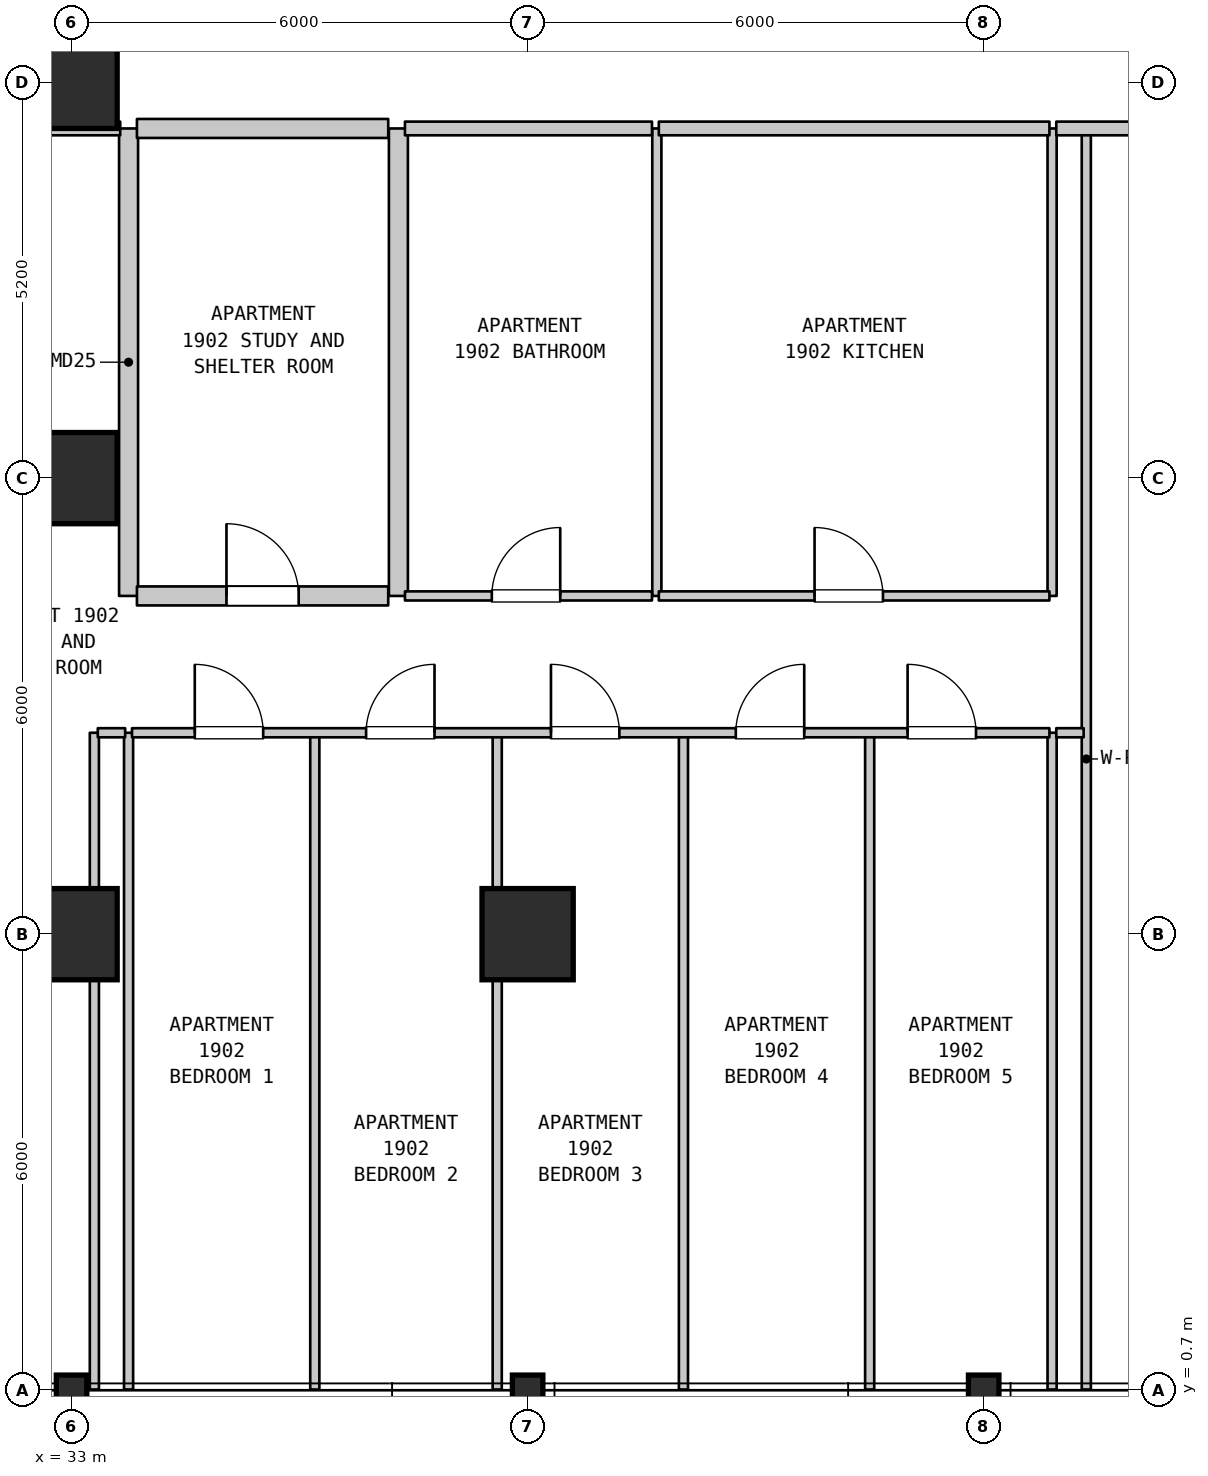
"""IFC4 building model, lengths in metres.
Left out: names, types, materials, properties, quantities, classifications, styles, units other than length and angle.
Written with IfcOpenShell. Run it as: python <this file> out.ifc"""

import sys

from ifc_helpers import new_model, si_unit, direction, frame, frame_2d, origin, origin_2d, place, context, subcontext, project, spatial, rectangle, i_section, extrude, element, fill, save


model = new_model("IFC4")
c1 = context("Model", 3, precision=1e-05, world=origin(), true_north=direction((0.0, 1.0)))
c2 = subcontext(c1, "Body", "Model", "MODEL_VIEW")
j1 = project(units=[si_unit("LENGTHUNIT", "METRE"), si_unit("PLANEANGLEUNIT", "RADIAN")], contexts=[c1])
p1 = place(None, origin())
s1 = spatial("IfcSite", under=j1, at=p1, CompositionType="ELEMENT")
p2 = place(p1, origin())
s2 = spatial("IfcBuilding", under=s1, at=p2, CompositionType="ELEMENT")
p3 = place(p2, frame((0.0, 0.0, 81.2)))
s3 = spatial("IfcBuildingStorey", under=s2, at=p3, CompositionType="ELEMENT", Elevation=81.2)
p4 = place(p3, frame((33.0, 0.7, 0.0), z_axis=(0.0, 0.0, 1.0), x_axis=(1.0, 0.0, 0.0)))
e1 = element("IfcColumn", 1, at=p4, inside=s3, PredefinedType="COLUMN", context=c2, shape_type="SweptSolid", body=[
    extrude(i_section(OverallWidth=0.401, OverallDepth=0.399, WebThickness=0.025, FlangeThickness=0.04, FilletRadius=0.015, at=origin_2d()), origin(), (0.0, 0.0, 1.0), 5.2),
])
for number, where, z_axis, x_axis in (
    (2, (33.0, 6.7, 0.0), (0.0, 0.0, 1.0), (1.0, 0.0, 0.0)),
    (3, (33.0, 12.7, 0.0), (0.0, 0.0, 1.0), (1.0, 0.0, 0.0)),
    (4, (33.0, 17.9, 0.0), (0.0, 0.0, 1.0), (1.0, 0.0, 0.0)),
):
    element("IfcColumn", number, at=place(p3, frame(where, z_axis=z_axis, x_axis=x_axis)), inside=s3, PredefinedType="COLUMN", context=c2, shape_type="SweptSolid", body=[
        extrude(rectangle(XDim=1.2, YDim=1.2, at=origin_2d()), origin(), (0.0, 0.0, 1.0), 5.2),
    ])
p5 = place(p3, frame((39.0, 0.7, 0.0), z_axis=(0.0, 0.0, 1.0), x_axis=(1.0, 0.0, 0.0)))
e5 = element("IfcColumn", 5, at=p5, inside=s3, PredefinedType="COLUMN", context=c2, shape_type="SweptSolid", body=[
    extrude(i_section(OverallWidth=0.401, OverallDepth=0.399, WebThickness=0.025, FlangeThickness=0.04, FilletRadius=0.015, at=origin_2d()), origin(), (0.0, 0.0, 1.0), 5.2),
])
p6 = place(p3, frame((39.0, 6.7, 0.0), z_axis=(0.0, 0.0, 1.0), x_axis=(1.0, 0.0, 0.0)))
e6 = element("IfcColumn", 6, at=p6, inside=s3, PredefinedType="COLUMN", context=c2, shape_type="SweptSolid", body=[
    extrude(rectangle(XDim=1.2, YDim=1.2, at=origin_2d()), origin(), (0.0, 0.0, 1.0), 5.2),
])
p7 = place(p3, frame((45.0, 0.7, 0.0), z_axis=(0.0, 0.0, 1.0), x_axis=(1.0, 0.0, 0.0)))
e7 = element("IfcColumn", 7, at=p7, inside=s3, PredefinedType="COLUMN", context=c2, shape_type="SweptSolid", body=[
    extrude(i_section(OverallWidth=0.401, OverallDepth=0.399, WebThickness=0.025, FlangeThickness=0.04, FilletRadius=0.015, at=origin_2d()), origin(), (0.0, 0.0, 1.0), 5.2),
])
for number, where, z_axis, x_axis in (
    (8, (33.3, 0.71, 0.0), (0.0, 0.0, 1.0), (0.0, 1.0, 0.0)),
    (9, (33.75, 0.71, 0.0), (0.0, 0.0, 1.0), (0.0, 1.0, 0.0)),
):
    element("IfcWall", number, at=place(p3, frame(where, z_axis=z_axis, x_axis=x_axis)), inside=s3, PredefinedType="PARTITIONING", context=c2, shape_type="SweptSolid", body=[
        extrude(rectangle(XDim=8.64, YDim=0.12, at=frame_2d((4.32, 0.0))), origin(), (0.0, 0.0, 1.0), 4.885),
    ])
p8 = place(p3, frame((33.75, 11.15, 0.0), z_axis=(0.0, 0.0, 1.0), x_axis=(0.0, 1.0, 0.0)))
e10 = element("IfcWall", 10, at=p8, inside=s3, PredefinedType="STANDARD", context=c2, shape_type="SweptSolid", body=[
    extrude(rectangle(XDim=6.15, YDim=0.25, at=frame_2d((3.075, 0.0))), origin(), (0.0, 0.0, 1.0), 4.885),
])
p9 = place(p3, frame((36.2, 0.71, 0.0), z_axis=(0.0, 0.0, 1.0), x_axis=(0.0, 1.0, 0.0)))
e11 = element("IfcWall", 11, at=p9, inside=s3, PredefinedType="PARTITIONING", context=c2, shape_type="SweptSolid", body=[
    extrude(rectangle(XDim=8.64, YDim=0.12, at=frame_2d((4.32, 0.0))), origin(), (0.0, 0.0, 1.0), 4.885),
])
p10 = place(p3, frame((37.3, 11.15, 0.0), z_axis=(0.0, 0.0, 1.0), x_axis=(0.0, 1.0, 0.0)))
e12 = element("IfcWall", 12, at=p10, inside=s3, PredefinedType="STANDARD", context=c2, shape_type="SweptSolid", body=[
    extrude(rectangle(XDim=6.15, YDim=0.25, at=frame_2d((3.075, 0.0))), origin(), (0.0, 0.0, 1.0), 4.885),
])
p11 = place(p3, frame((38.6, 0.71, 0.0), z_axis=(0.0, 0.0, 1.0), x_axis=(0.0, 1.0, 0.0)))
e13 = element("IfcWall", 13, at=p11, inside=s3, PredefinedType="PARTITIONING", context=c2, shape_type="SweptSolid", body=[
    extrude(rectangle(XDim=8.64, YDim=0.12, at=frame_2d((4.32, 0.0))), origin(), (0.0, 0.0, 1.0), 4.885),
])
p12 = place(p3, frame((40.7, 11.15, 0.0), z_axis=(0.0, 0.0, 1.0), x_axis=(0.0, 1.0, 0.0)))
e14 = element("IfcWall", 14, at=p12, inside=s3, PredefinedType="PARTITIONING", context=c2, shape_type="SweptSolid", body=[
    extrude(rectangle(XDim=6.15, YDim=0.12, at=frame_2d((3.075, 0.0))), origin(), (0.0, 0.0, 1.0), 4.885),
])
for number, where, z_axis, x_axis in (
    (15, (41.05, 0.71, 0.0), (0.0, 0.0, 1.0), (0.0, 1.0, 0.0)),
    (16, (43.5, 0.71, 0.0), (0.0, 0.0, 1.0), (0.0, 1.0, 0.0)),
    (17, (45.9, 0.71, 0.0), (0.0, 0.0, 1.0), (0.0, 1.0, 0.0)),
):
    element("IfcWall", number, at=place(p3, frame(where, z_axis=z_axis, x_axis=x_axis)), inside=s3, PredefinedType="PARTITIONING", context=c2, shape_type="SweptSolid", body=[
        extrude(rectangle(XDim=8.64, YDim=0.12, at=frame_2d((4.32, 0.0))), origin(), (0.0, 0.0, 1.0), 4.885),
    ])
p13 = place(p3, frame((45.9, 11.15, 0.0), z_axis=(0.0, 0.0, 1.0), x_axis=(0.0, 1.0, 0.0)))
e18 = element("IfcWall", 18, at=p13, inside=s3, PredefinedType="PARTITIONING", context=c2, shape_type="SweptSolid", body=[
    extrude(rectangle(XDim=6.15, YDim=0.12, at=frame_2d((3.075, 0.0))), origin(), (0.0, 0.0, 1.0), 4.885),
])
p14 = place(p3, frame((46.35, 0.71, 0.0), z_axis=(0.0, 0.0, 1.0), x_axis=(0.0, 1.0, 0.0)))
e19 = element("IfcWall", 19, at=p14, inside=s3, PredefinedType="PARTITIONING", context=c2, shape_type="SweptSolid", body=[
    extrude(rectangle(XDim=16.59, YDim=0.12, at=frame_2d((8.295, 0.0))), origin(), (0.0, 0.0, 1.0), 4.885),
])
p15 = place(p3, frame((33.345, 9.35, 0.0), z_axis=(0.0, 0.0, 1.0), x_axis=(1.0, 0.0, 0.0)))
e20 = element("IfcWall", 20, at=p15, inside=s3, PredefinedType="PARTITIONING", context=c2, shape_type="SweptSolid", body=[
    extrude(rectangle(XDim=0.36, YDim=0.12, at=frame_2d((0.18, 0.0))), origin(), (0.0, 0.0, 1.0), 4.885),
])
p16 = place(p3, frame((33.795, 9.35, 0.0), z_axis=(0.0, 0.0, 1.0), x_axis=(1.0, 0.0, 0.0)))
e21 = element("IfcWall", 21, at=p16, inside=s3, PredefinedType="PARTITIONING", context=c2, shape_type="SweptSolid", body=[
    extrude(rectangle(XDim=12.07, YDim=0.12, at=frame_2d((6.035, 0.0))), origin(), (0.0, 0.0, 1.0), 4.885),
])
p17 = place(p16, frame((0.826, 0.0, 0.0)))
e22 = element("IfcOpeningElement", 22, at=p17, cuts=e21, PredefinedType="OPENING", context=c2, shape_type="SweptSolid", body=[
    extrude(rectangle(XDim=0.9, YDim=2.15, at=frame_2d((0.45, 1.075))), frame((0.0, 0.07, 0.0), z_axis=(0.0, -1.0, 0.0), x_axis=(1.0, 0.0, 0.0)), (0.0, 0.0, 1.0), 0.14),
])
p18 = place(p16, frame((3.08, 0.0, 0.0)))
e23 = element("IfcOpeningElement", 23, at=p18, cuts=e21, PredefinedType="OPENING", context=c2, shape_type="SweptSolid", body=[
    extrude(rectangle(XDim=0.9, YDim=2.15, at=frame_2d((0.45, 1.075))), frame((0.0, 0.07, 0.0), z_axis=(0.0, -1.0, 0.0), x_axis=(1.0, 0.0, 0.0)), (0.0, 0.0, 1.0), 0.14),
])
p19 = place(p16, frame((5.512, 0.0, 0.0)))
e24 = element("IfcOpeningElement", 24, at=p19, cuts=e21, PredefinedType="OPENING", context=c2, shape_type="SweptSolid", body=[
    extrude(rectangle(XDim=0.9, YDim=2.15, at=frame_2d((0.45, 1.075))), frame((0.0, 0.07, 0.0), z_axis=(0.0, -1.0, 0.0), x_axis=(1.0, 0.0, 0.0)), (0.0, 0.0, 1.0), 0.14),
])
p20 = place(p16, frame((7.944, 0.0, 0.0)))
e25 = element("IfcOpeningElement", 25, at=p20, cuts=e21, PredefinedType="OPENING", context=c2, shape_type="SweptSolid", body=[
    extrude(rectangle(XDim=0.9, YDim=2.15, at=frame_2d((0.45, 1.075))), frame((0.0, 0.07, 0.0), z_axis=(0.0, -1.0, 0.0), x_axis=(1.0, 0.0, 0.0)), (0.0, 0.0, 1.0), 0.14),
])
p21 = place(p16, frame((10.204, 0.0, 0.0)))
e26 = element("IfcOpeningElement", 26, at=p21, cuts=e21, PredefinedType="OPENING", context=c2, shape_type="SweptSolid", body=[
    extrude(rectangle(XDim=0.9, YDim=2.15, at=frame_2d((0.45, 1.075))), frame((0.0, 0.07, 0.0), z_axis=(0.0, -1.0, 0.0), x_axis=(1.0, 0.0, 0.0)), (0.0, 0.0, 1.0), 0.14),
])
p22 = place(p3, frame((45.955, 9.35, 0.0), z_axis=(0.0, 0.0, 1.0), x_axis=(1.0, 0.0, 0.0)))
e27 = element("IfcWall", 27, at=p22, inside=s3, PredefinedType="PARTITIONING", context=c2, shape_type="SweptSolid", body=[
    extrude(rectangle(XDim=0.36, YDim=0.12, at=frame_2d((0.18, 0.0))), origin(), (0.0, 0.0, 1.0), 4.885),
])
p23 = place(p3, frame((33.86, 11.15, 0.0), z_axis=(0.0, 0.0, 1.0), x_axis=(1.0, 0.0, 0.0)))
e28 = element("IfcWall", 28, at=p23, inside=s3, PredefinedType="STANDARD", context=c2, shape_type="SweptSolid", body=[
    extrude(rectangle(XDim=3.306, YDim=0.25, at=frame_2d((1.653, 0.0))), origin(), (0.0, 0.0, 1.0), 4.885),
])
p24 = place(p23, frame((1.178, 0.0, 0.0)))
e29 = element("IfcOpeningElement", 29, at=p24, cuts=e28, PredefinedType="OPENING", context=c2, shape_type="SweptSolid", body=[
    extrude(rectangle(XDim=0.95, YDim=2.15, at=frame_2d((0.475, 1.075))), frame((0.0, 0.135, 0.0), z_axis=(0.0, -1.0, 0.0), x_axis=(1.0, 0.0, 0.0)), (0.0, 0.0, 1.0), 0.27),
])
p25 = place(p3, frame((37.386, 11.15, 0.0), z_axis=(0.0, 0.0, 1.0), x_axis=(1.0, 0.0, 0.0)))
e30 = element("IfcWall", 30, at=p25, inside=s3, PredefinedType="PARTITIONING", context=c2, shape_type="SweptSolid", body=[
    extrude(rectangle(XDim=3.25, YDim=0.12, at=frame_2d((1.625, 0.0))), origin(), (0.0, 0.0, 1.0), 4.885),
])
p26 = place(p25, frame((1.143, 0.0, 0.0)))
e31 = element("IfcOpeningElement", 31, at=p26, cuts=e30, PredefinedType="OPENING", context=c2, shape_type="SweptSolid", body=[
    extrude(rectangle(XDim=0.9, YDim=2.1, at=frame_2d((0.45, 1.05))), frame((0.0, 0.07, 0.0), z_axis=(0.0, -1.0, 0.0), x_axis=(1.0, 0.0, 0.0)), (0.0, 0.0, 1.0), 0.14),
])
p27 = place(p3, frame((40.726, 11.15, 0.0), z_axis=(0.0, 0.0, 1.0), x_axis=(1.0, 0.0, 0.0)))
e32 = element("IfcWall", 32, at=p27, inside=s3, PredefinedType="PARTITIONING", context=c2, shape_type="SweptSolid", body=[
    extrude(rectangle(XDim=5.139, YDim=0.12, at=frame_2d((2.569, 0.0))), origin(), (0.0, 0.0, 1.0), 4.885),
])
p28 = place(p27, frame((2.049, 0.0, 0.0)))
e33 = element("IfcOpeningElement", 33, at=p28, cuts=e32, PredefinedType="OPENING", context=c2, shape_type="SweptSolid", body=[
    extrude(rectangle(XDim=0.9, YDim=2.15, at=frame_2d((0.45, 1.075))), frame((0.0, 0.07, 0.0), z_axis=(0.0, -1.0, 0.0), x_axis=(1.0, 0.0, 0.0)), (0.0, 0.0, 1.0), 0.14),
])
p29 = place(p3, frame((28.545, 17.3, 0.0), z_axis=(0.0, 0.0, 1.0), x_axis=(1.0, 0.0, 0.0)))
e34 = element("IfcWall", 34, at=p29, inside=s3, PredefinedType="STANDARD", context=c2, shape_type="SweptSolid", body=[
    extrude(rectangle(XDim=5.095, YDim=0.18, at=frame_2d((2.547, 0.0))), origin(), (0.0, 0.0, 1.0), 4.885),
])
p30 = place(p29, frame((2.08, 0.0, 0.0)))
e35 = element("IfcOpeningElement", 35, at=p30, cuts=e34, PredefinedType="OPENING", context=c2, shape_type="SweptSolid", body=[
    extrude(rectangle(XDim=1.0, YDim=2.15, at=frame_2d((0.5, 1.075))), frame((0.0, 0.1, 0.0), z_axis=(0.0, -1.0, 0.0), x_axis=(1.0, 0.0, 0.0)), (0.0, 0.0, 1.0), 0.2),
])
p31 = place(p3, frame((33.86, 17.3, 0.0), z_axis=(0.0, 0.0, 1.0), x_axis=(1.0, 0.0, 0.0)))
e36 = element("IfcWall", 36, at=p31, inside=s3, PredefinedType="STANDARD", context=c2, shape_type="SweptSolid", body=[
    extrude(rectangle(XDim=3.306, YDim=0.25, at=frame_2d((1.653, 0.0))), origin(), (0.0, 0.0, 1.0), 4.885),
])
p32 = place(p3, frame((37.386, 17.3, 0.0), z_axis=(0.0, 0.0, 1.0), x_axis=(1.0, 0.0, 0.0)))
e37 = element("IfcWall", 37, at=p32, inside=s3, PredefinedType="STANDARD", context=c2, shape_type="SweptSolid", body=[
    extrude(rectangle(XDim=3.25, YDim=0.18, at=frame_2d((1.625, 0.0))), origin(), (0.0, 0.0, 1.0), 4.885),
])
p33 = place(p3, frame((40.726, 17.3, 0.0), z_axis=(0.0, 0.0, 1.0), x_axis=(1.0, 0.0, 0.0)))
e38 = element("IfcWall", 38, at=p33, inside=s3, PredefinedType="STANDARD", context=c2, shape_type="SweptSolid", body=[
    extrude(rectangle(XDim=5.139, YDim=0.18, at=frame_2d((2.569, 0.0))), origin(), (0.0, 0.0, 1.0), 4.885),
])
p34 = place(p3, frame((45.955, 17.3, 0.0), z_axis=(0.0, 0.0, 1.0), x_axis=(1.0, 0.0, 0.0)))
e39 = element("IfcWall", 39, at=p34, inside=s3, PredefinedType="STANDARD", context=c2, shape_type="SweptSolid", body=[
    extrude(rectangle(XDim=4.8, YDim=0.18, at=frame_2d((2.4, 0.0))), origin(), (0.0, 0.0, 1.0), 4.885),
])
p35 = place(p34, frame((1.9, 0.0, 0.0)))
e40 = element("IfcOpeningElement", 40, at=p35, cuts=e39, PredefinedType="OPENING", context=c2, shape_type="SweptSolid", body=[
    extrude(rectangle(XDim=1.0, YDim=2.15, at=frame_2d((0.5, 1.075))), frame((0.0, 0.1, 0.0), z_axis=(0.0, -1.0, 0.0), x_axis=(1.0, 0.0, 0.0)), (0.0, 0.0, 1.0), 0.2),
])
p36 = place(p17, origin())
e41 = element("IfcDoor", 41, at=p36, inside=s3, OperationType="SINGLE_SWING_LEFT", PredefinedType="DOOR", context=c2, shape_type="SweptSolid", body=[
    extrude(rectangle(XDim=0.9, YDim=2.15, at=frame_2d((0.45, 1.075))), frame((0.0, 0.025, 0.0), z_axis=(0.0, -1.0, 0.0), x_axis=(1.0, 0.0, 0.0)), (0.0, 0.0, 1.0), 0.05),
])
fill(e22, e41)
p37 = place(p18, origin())
e42 = element("IfcDoor", 42, at=p37, inside=s3, OperationType="SINGLE_SWING_RIGHT", PredefinedType="DOOR", context=c2, shape_type="SweptSolid", body=[
    extrude(rectangle(XDim=0.9, YDim=2.15, at=frame_2d((0.45, 1.075))), frame((0.0, 0.025, 0.0), z_axis=(0.0, -1.0, 0.0), x_axis=(1.0, 0.0, 0.0)), (0.0, 0.0, 1.0), 0.05),
])
fill(e23, e42)
p38 = place(p19, origin())
e43 = element("IfcDoor", 43, at=p38, inside=s3, OperationType="SINGLE_SWING_LEFT", PredefinedType="DOOR", context=c2, shape_type="SweptSolid", body=[
    extrude(rectangle(XDim=0.9, YDim=2.15, at=frame_2d((0.45, 1.075))), frame((0.0, 0.025, 0.0), z_axis=(0.0, -1.0, 0.0), x_axis=(1.0, 0.0, 0.0)), (0.0, 0.0, 1.0), 0.05),
])
fill(e24, e43)
p39 = place(p20, origin())
e44 = element("IfcDoor", 44, at=p39, inside=s3, OperationType="SINGLE_SWING_RIGHT", PredefinedType="DOOR", context=c2, shape_type="SweptSolid", body=[
    extrude(rectangle(XDim=0.9, YDim=2.15, at=frame_2d((0.45, 1.075))), frame((0.0, 0.025, 0.0), z_axis=(0.0, -1.0, 0.0), x_axis=(1.0, 0.0, 0.0)), (0.0, 0.0, 1.0), 0.05),
])
fill(e25, e44)
p40 = place(p21, origin())
e45 = element("IfcDoor", 45, at=p40, inside=s3, OperationType="SINGLE_SWING_LEFT", PredefinedType="DOOR", context=c2, shape_type="SweptSolid", body=[
    extrude(rectangle(XDim=0.9, YDim=2.15, at=frame_2d((0.45, 1.075))), frame((0.0, 0.025, 0.0), z_axis=(0.0, -1.0, 0.0), x_axis=(1.0, 0.0, 0.0)), (0.0, 0.0, 1.0), 0.05),
])
fill(e26, e45)
p41 = place(p24, origin())
e46 = element("IfcDoor", 46, at=p41, inside=s3, OperationType="SINGLE_SWING_LEFT", PredefinedType="DOOR", context=c2, shape_type="SweptSolid", body=[
    extrude(rectangle(XDim=0.95, YDim=2.15, at=frame_2d((0.475, 1.075))), frame((0.0, 0.025, 0.0), z_axis=(0.0, -1.0, 0.0), x_axis=(1.0, 0.0, 0.0)), (0.0, 0.0, 1.0), 0.05),
])
fill(e29, e46)
p42 = place(p26, origin())
e47 = element("IfcDoor", 47, at=p42, inside=s3, OperationType="SINGLE_SWING_RIGHT", PredefinedType="DOOR", context=c2, shape_type="SweptSolid", body=[
    extrude(rectangle(XDim=0.9, YDim=2.1, at=frame_2d((0.45, 1.05))), frame((0.0, 0.025, 0.0), z_axis=(0.0, -1.0, 0.0), x_axis=(1.0, 0.0, 0.0)), (0.0, 0.0, 1.0), 0.05),
])
fill(e31, e47)
p43 = place(p28, origin())
e48 = element("IfcDoor", 48, at=p43, inside=s3, OperationType="SINGLE_SWING_LEFT", PredefinedType="DOOR", context=c2, shape_type="SweptSolid", body=[
    extrude(rectangle(XDim=0.9, YDim=2.15, at=frame_2d((0.45, 1.075))), frame((0.0, 0.025, 0.0), z_axis=(0.0, -1.0, 0.0), x_axis=(1.0, 0.0, 0.0)), (0.0, 0.0, 1.0), 0.05),
])
fill(e33, e48)
save(model, sys.argv[1])
